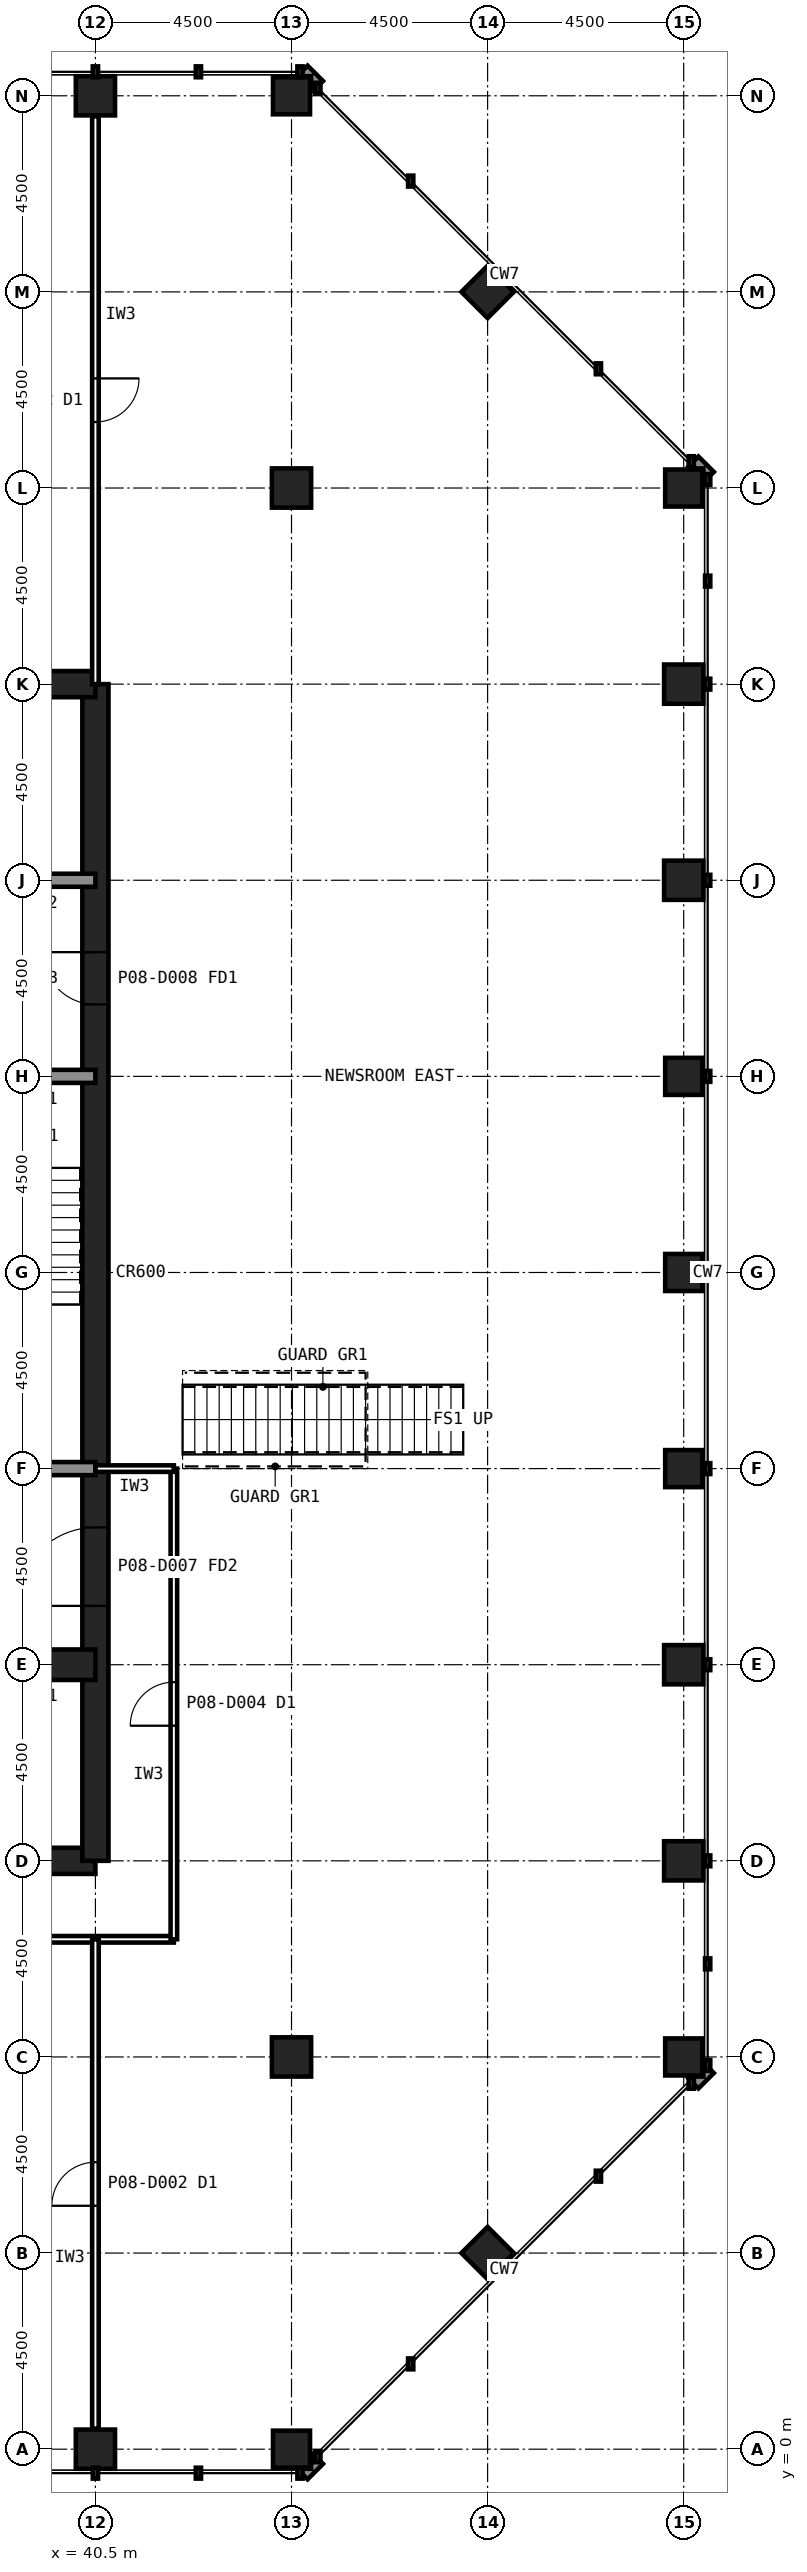
"""IFC4 building model, lengths in metres.
Left out: names, types, materials, properties, quantities, classifications, styles, units other than length and angle.
Written with IfcOpenShell. Run it as: python <this file> out.ifc"""

import sys

from ifc_helpers import new_model, si_unit, direction, frame, frame_2d, origin, origin_2d, place, context, subcontext, project, spatial, rectangle, hollow_rectangle, extrude, element, fill, save


model = new_model("IFC4")
c1 = context("Model", 3, precision=1e-05, world=origin(), true_north=direction((0.0, 1.0)))
c2 = subcontext(c1, "Body", "Model", "MODEL_VIEW")
j1 = project(units=[si_unit("LENGTHUNIT", "METRE"), si_unit("PLANEANGLEUNIT", "RADIAN")], contexts=[c1])
p1 = place(None, origin())
s1 = spatial("IfcSite", under=j1, at=p1, CompositionType="ELEMENT")
p2 = place(p1, origin())
s2 = spatial("IfcBuilding", under=s1, at=p2, CompositionType="ELEMENT")
p3 = place(p2, frame((0.0, 0.0, 37.4)))
s3 = spatial("IfcBuildingStorey", under=s2, at=p3, CompositionType="ELEMENT", Elevation=37.4)
p4 = place(p3, frame((40.5, 0.0, 0.0), z_axis=(0.0, 0.0, 1.0), x_axis=(1.0, 0.0, 0.0)))
e1 = element("IfcColumn", 1, at=p4, inside=s3, PredefinedType="COLUMN", context=c2, shape_type="SweptSolid", body=[
    extrude(hollow_rectangle(XDim=0.9, YDim=0.9, WallThickness=0.063, at=origin_2d()), origin(), (0.0, 0.0, 1.0), 4.2),
])
for number, where, z_axis, x_axis in (
    (2, (45.0, 0.0, 0.0), (0.0, 0.0, 1.0), (1.0, 0.0, 0.0)),
    (3, (54.0, 9.0, 0.0), (0.0, 0.0, 1.0), (1.0, 0.0, 0.0)),
):
    element("IfcColumn", number, at=place(p3, frame(where, z_axis=z_axis, x_axis=x_axis)), inside=s3, PredefinedType="COLUMN", context=c2, shape_type="SweptSolid", body=[
        extrude(hollow_rectangle(XDim=0.85, YDim=0.85, WallThickness=0.05, at=origin_2d()), origin(), (0.0, 0.0, 1.0), 4.2),
    ])
for number, where, z_axis, x_axis in (
    (4, (54.0, 13.5, 0.0), (0.0, 0.0, 1.0), (1.0, 0.0, 0.0)),
    (5, (54.0, 18.0, 0.0), (0.0, 0.0, 1.0), (1.0, 0.0, 0.0)),
):
    element("IfcColumn", number, at=place(p3, frame(where, z_axis=z_axis, x_axis=x_axis)), inside=s3, PredefinedType="COLUMN", context=c2, shape_type="SweptSolid", body=[
        extrude(hollow_rectangle(XDim=0.9, YDim=0.9, WallThickness=0.063, at=origin_2d()), origin(), (0.0, 0.0, 1.0), 4.2),
    ])
for number, where, z_axis, x_axis in (
    (6, (54.0, 22.5, 0.0), (0.0, 0.0, 1.0), (1.0, 0.0, 0.0)),
    (7, (54.0, 27.0, 0.0), (0.0, 0.0, 1.0), (1.0, 0.0, 0.0)),
    (8, (54.0, 31.5, 0.0), (0.0, 0.0, 1.0), (1.0, 0.0, 0.0)),
):
    element("IfcColumn", number, at=place(p3, frame(where, z_axis=z_axis, x_axis=x_axis)), inside=s3, PredefinedType="COLUMN", context=c2, shape_type="SweptSolid", body=[
        extrude(hollow_rectangle(XDim=0.85, YDim=0.85, WallThickness=0.05, at=origin_2d()), origin(), (0.0, 0.0, 1.0), 4.2),
    ])
for number, where, z_axis, x_axis in (
    (9, (54.0, 36.0, 0.0), (0.0, 0.0, 1.0), (1.0, 0.0, 0.0)),
    (10, (54.0, 40.5, 0.0), (0.0, 0.0, 1.0), (1.0, 0.0, 0.0)),
):
    element("IfcColumn", number, at=place(p3, frame(where, z_axis=z_axis, x_axis=x_axis)), inside=s3, PredefinedType="COLUMN", context=c2, shape_type="SweptSolid", body=[
        extrude(hollow_rectangle(XDim=0.9, YDim=0.9, WallThickness=0.063, at=origin_2d()), origin(), (0.0, 0.0, 1.0), 4.2),
    ])
for number, where, z_axis, x_axis in (
    (11, (54.0, 45.0, 0.0), (0.0, 0.0, 1.0), (1.0, 0.0, 0.0)),
    (12, (45.0, 54.0, 0.0), (0.0, 0.0, 1.0), (1.0, 0.0, 0.0)),
):
    element("IfcColumn", number, at=place(p3, frame(where, z_axis=z_axis, x_axis=x_axis)), inside=s3, PredefinedType="COLUMN", context=c2, shape_type="SweptSolid", body=[
        extrude(hollow_rectangle(XDim=0.85, YDim=0.85, WallThickness=0.05, at=origin_2d()), origin(), (0.0, 0.0, 1.0), 4.2),
    ])
p5 = place(p3, frame((40.5, 54.0, 0.0), z_axis=(0.0, 0.0, 1.0), x_axis=(1.0, 0.0, 0.0)))
e13 = element("IfcColumn", 13, at=p5, inside=s3, PredefinedType="COLUMN", context=c2, shape_type="SweptSolid", body=[
    extrude(hollow_rectangle(XDim=0.9, YDim=0.9, WallThickness=0.063, at=origin_2d()), origin(), (0.0, 0.0, 1.0), 4.2),
])
for number, where, z_axis, x_axis in (
    (14, (49.5, 4.5, 0.0), (0.0, 0.0, 1.0), (0.707, 0.707, 0.0)),
    (15, (49.5, 49.5, 0.0), (0.0, 0.0, 1.0), (0.707, 0.707, 0.0)),
):
    element("IfcColumn", number, at=place(p3, frame(where, z_axis=z_axis, x_axis=x_axis)), inside=s3, PredefinedType="COLUMN", context=c2, shape_type="SweptSolid", body=[
        extrude(hollow_rectangle(XDim=0.85, YDim=0.85, WallThickness=0.05, at=origin_2d()), origin(), (0.0, 0.0, 1.0), 4.2),
    ])
for number, where, z_axis, x_axis in (
    (16, (45.0, 9.0, 0.0), (0.0, 0.0, 1.0), (1.0, 0.0, 0.0)),
    (17, (45.0, 45.0, 0.0), (0.0, 0.0, 1.0), (1.0, 0.0, 0.0)),
):
    element("IfcColumn", number, at=place(p3, frame(where, z_axis=z_axis, x_axis=x_axis)), inside=s3, PredefinedType="COLUMN", context=c2, shape_type="SweptSolid", body=[
        extrude(hollow_rectangle(XDim=0.9, YDim=0.9, WallThickness=0.063, at=origin_2d()), origin(), (0.0, 0.0, 1.0), 4.2),
    ])
p6 = place(p3, frame((13.5, 13.5, 0.0), z_axis=(0.0, 0.0, 1.0), x_axis=(1.0, 0.0, 0.0)))
e18 = element("IfcWall", 18, at=p6, inside=s3, PredefinedType="SHEAR", context=c2, shape_type="SweptSolid", body=[
    extrude(rectangle(XDim=27.0, YDim=0.6, at=frame_2d((13.5, 0.0))), origin(), (0.0, 0.0, 1.0), 4.2),
])
p7 = place(p3, frame((40.5, 13.5, 0.0), z_axis=(0.0, 0.0, 1.0), x_axis=(0.0, 1.0, 0.0)))
e19 = element("IfcWall", 19, at=p7, inside=s3, PredefinedType="SHEAR", context=c2, shape_type="SweptSolid", body=[
    extrude(rectangle(XDim=27.0, YDim=0.6, at=frame_2d((13.5, 0.0))), origin(), (0.0, 0.0, 1.0), 4.2),
])
p8 = place(p7, frame((5.85, 0.0, 0.0)))
e20 = element("IfcOpeningElement", 20, at=p8, cuts=e19, PredefinedType="OPENING", context=c2, shape_type="SweptSolid", body=[
    extrude(rectangle(XDim=1.8, YDim=2.1, at=frame_2d((0.9, 1.05))), frame((0.0, 0.31, 0.0), z_axis=(0.0, -1.0, 0.0), x_axis=(1.0, 0.0, 0.0)), (0.0, 0.0, 1.0), 0.62),
])
p9 = place(p7, frame((19.65, 0.0, 0.0)))
e21 = element("IfcOpeningElement", 21, at=p9, cuts=e19, PredefinedType="OPENING", context=c2, shape_type="SweptSolid", body=[
    extrude(rectangle(XDim=1.2, YDim=2.1, at=frame_2d((0.6, 1.05))), frame((0.0, 0.31, 0.0), z_axis=(0.0, -1.0, 0.0), x_axis=(1.0, 0.0, 0.0)), (0.0, 0.0, 1.0), 0.62),
])
p10 = place(p3, frame((40.5, 40.5, 0.0), z_axis=(0.0, 0.0, 1.0), x_axis=(-1.0, 0.0, 0.0)))
e22 = element("IfcWall", 22, at=p10, inside=s3, PredefinedType="SHEAR", context=c2, shape_type="SweptSolid", body=[
    extrude(rectangle(XDim=27.0, YDim=0.6, at=frame_2d((13.5, 0.0))), origin(), (0.0, 0.0, 1.0), 4.2),
])
p11 = place(p3, frame((13.5, 18.0, 0.0), z_axis=(0.0, 0.0, 1.0), x_axis=(1.0, 0.0, 0.0)))
e23 = element("IfcWall", 23, at=p11, inside=s3, PredefinedType="SHEAR", context=c2, shape_type="SweptSolid", body=[
    extrude(rectangle(XDim=27.0, YDim=0.7, at=frame_2d((13.5, 0.0))), origin(), (0.0, 0.0, 1.0), 4.2),
])
p12 = place(p11, frame((24.3, 0.0, 0.0)))
e24 = element("IfcOpeningElement", 24, at=p12, cuts=e23, PredefinedType="OPENING", context=c2, shape_type="SweptSolid", body=[
    extrude(rectangle(XDim=0.9, YDim=2.1, at=frame_2d((0.45, 1.05))), frame((0.0, 0.36, 0.0), z_axis=(0.0, -1.0, 0.0), x_axis=(1.0, 0.0, 0.0)), (0.0, 0.0, 1.0), 0.72),
])
p13 = place(p11, frame((5.45, 0.0, 0.0)))
e25 = element("IfcOpeningElement", 25, at=p13, cuts=e23, PredefinedType="OPENING", context=c2, shape_type="SweptSolid", body=[
    extrude(rectangle(XDim=1.1, YDim=2.1, at=frame_2d((0.55, 1.05))), frame((0.0, 0.36, 0.0), z_axis=(0.0, -1.0, 0.0), x_axis=(1.0, 0.0, 0.0)), (0.0, 0.0, 1.0), 0.72),
])
p14 = place(p11, frame((8.45, 0.0, 0.0)))
e26 = element("IfcOpeningElement", 26, at=p14, cuts=e23, PredefinedType="OPENING", context=c2, shape_type="SweptSolid", body=[
    extrude(rectangle(XDim=1.1, YDim=2.1, at=frame_2d((0.55, 1.05))), frame((0.0, 0.36, 0.0), z_axis=(0.0, -1.0, 0.0), x_axis=(1.0, 0.0, 0.0)), (0.0, 0.0, 1.0), 0.72),
])
p15 = place(p11, frame((11.45, 0.0, 0.0)))
e27 = element("IfcOpeningElement", 27, at=p15, cuts=e23, PredefinedType="OPENING", context=c2, shape_type="SweptSolid", body=[
    extrude(rectangle(XDim=1.1, YDim=2.1, at=frame_2d((0.55, 1.05))), frame((0.0, 0.36, 0.0), z_axis=(0.0, -1.0, 0.0), x_axis=(1.0, 0.0, 0.0)), (0.0, 0.0, 1.0), 0.72),
])
p16 = place(p11, frame((14.45, 0.0, 0.0)))
e28 = element("IfcOpeningElement", 28, at=p16, cuts=e23, PredefinedType="OPENING", context=c2, shape_type="SweptSolid", body=[
    extrude(rectangle(XDim=1.1, YDim=2.1, at=frame_2d((0.55, 1.05))), frame((0.0, 0.36, 0.0), z_axis=(0.0, -1.0, 0.0), x_axis=(1.0, 0.0, 0.0)), (0.0, 0.0, 1.0), 0.72),
])
p17 = place(p11, frame((17.45, 0.0, 0.0)))
e29 = element("IfcOpeningElement", 29, at=p17, cuts=e23, PredefinedType="OPENING", context=c2, shape_type="SweptSolid", body=[
    extrude(rectangle(XDim=1.1, YDim=2.1, at=frame_2d((0.55, 1.05))), frame((0.0, 0.36, 0.0), z_axis=(0.0, -1.0, 0.0), x_axis=(1.0, 0.0, 0.0)), (0.0, 0.0, 1.0), 0.72),
])
p18 = place(p11, frame((20.45, 0.0, 0.0)))
e30 = element("IfcOpeningElement", 30, at=p18, cuts=e23, PredefinedType="OPENING", context=c2, shape_type="SweptSolid", body=[
    extrude(rectangle(XDim=1.1, YDim=2.1, at=frame_2d((0.55, 1.05))), frame((0.0, 0.36, 0.0), z_axis=(0.0, -1.0, 0.0), x_axis=(1.0, 0.0, 0.0)), (0.0, 0.0, 1.0), 0.72),
])
p19 = place(p11, frame((1.6, 0.0, 0.0)))
e31 = element("IfcOpeningElement", 31, at=p19, cuts=e23, PredefinedType="OPENING", context=c2, shape_type="SweptSolid", body=[
    extrude(rectangle(XDim=1.3, YDim=2.2, at=frame_2d((0.65, 1.1))), frame((0.0, 0.36, 0.0), z_axis=(0.0, -1.0, 0.0), x_axis=(1.0, 0.0, 0.0)), (0.0, 0.0, 1.0), 0.72),
])
p20 = place(p3, frame((13.5, 36.0, 0.0), z_axis=(0.0, 0.0, 1.0), x_axis=(1.0, 0.0, 0.0)))
e32 = element("IfcWall", 32, at=p20, inside=s3, PredefinedType="SOLIDWALL", context=c2, shape_type="SweptSolid", body=[
    extrude(rectangle(XDim=27.0, YDim=0.3, at=frame_2d((13.5, 0.0))), origin(), (0.0, 0.0, 1.0), 4.04),
])
p21 = place(p20, frame((1.8, 0.0, 0.0)))
e33 = element("IfcOpeningElement", 33, at=p21, cuts=e32, PredefinedType="OPENING", context=c2, shape_type="SweptSolid", body=[
    extrude(rectangle(XDim=0.9, YDim=2.1, at=frame_2d((0.45, 1.05))), frame((0.0, 0.16, 0.0), z_axis=(0.0, -1.0, 0.0), x_axis=(1.0, 0.0, 0.0)), (0.0, 0.0, 1.0), 0.32),
])
p22 = place(p20, frame((24.1, 0.0, 0.0)))
e34 = element("IfcOpeningElement", 34, at=p22, cuts=e32, PredefinedType="OPENING", context=c2, shape_type="SweptSolid", body=[
    extrude(rectangle(XDim=1.3, YDim=2.2, at=frame_2d((0.65, 1.1))), frame((0.0, 0.16, 0.0), z_axis=(0.0, -1.0, 0.0), x_axis=(1.0, 0.0, 0.0)), (0.0, 0.0, 1.0), 0.32),
])
p23 = place(p3, frame((13.5, 22.5, 0.0), z_axis=(0.0, 0.0, 1.0), x_axis=(1.0, 0.0, 0.0)))
e35 = element("IfcWall", 35, at=p23, inside=s3, PredefinedType="SOLIDWALL", context=c2, shape_type="SweptSolid", body=[
    extrude(rectangle(XDim=27.0, YDim=0.3, at=frame_2d((13.5, 0.0))), origin(), (0.0, 0.0, 1.0), 4.04),
])
p24 = place(p23, frame((1.65, 0.0, 0.0)))
e36 = element("IfcOpeningElement", 36, at=p24, cuts=e35, PredefinedType="OPENING", context=c2, shape_type="SweptSolid", body=[
    extrude(rectangle(XDim=1.2, YDim=2.1, at=frame_2d((0.6, 1.05))), frame((0.0, 0.16, 0.0), z_axis=(0.0, -1.0, 0.0), x_axis=(1.0, 0.0, 0.0)), (0.0, 0.0, 1.0), 0.32),
])
p25 = place(p23, frame((6.025, 0.0, 0.0)))
e37 = element("IfcOpeningElement", 37, at=p25, cuts=e35, PredefinedType="OPENING", context=c2, shape_type="SweptSolid", body=[
    extrude(rectangle(XDim=1.0, YDim=2.1, at=frame_2d((0.5, 1.05))), frame((0.0, 0.16, 0.0), z_axis=(0.0, -1.0, 0.0), x_axis=(1.0, 0.0, 0.0)), (0.0, 0.0, 1.0), 0.32),
])
p26 = place(p23, frame((10.525, 0.0, 0.0)))
e38 = element("IfcOpeningElement", 38, at=p26, cuts=e35, PredefinedType="OPENING", context=c2, shape_type="SweptSolid", body=[
    extrude(rectangle(XDim=1.0, YDim=2.1, at=frame_2d((0.5, 1.05))), frame((0.0, 0.16, 0.0), z_axis=(0.0, -1.0, 0.0), x_axis=(1.0, 0.0, 0.0)), (0.0, 0.0, 1.0), 0.32),
])
p27 = place(p23, frame((19.75, 0.0, 0.0)))
e39 = element("IfcOpeningElement", 39, at=p27, cuts=e35, PredefinedType="OPENING", context=c2, shape_type="SweptSolid", body=[
    extrude(rectangle(XDim=1.0, YDim=2.1, at=frame_2d((0.5, 1.05))), frame((0.0, 0.16, 0.0), z_axis=(0.0, -1.0, 0.0), x_axis=(1.0, 0.0, 0.0)), (0.0, 0.0, 1.0), 0.32),
])
p28 = place(p23, frame((15.05, 0.0, 0.0)))
e40 = element("IfcOpeningElement", 40, at=p28, cuts=e35, PredefinedType="OPENING", context=c2, shape_type="SweptSolid", body=[
    extrude(rectangle(XDim=1.4, YDim=2.4, at=frame_2d((0.7, 1.2))), frame((0.0, 0.16, 0.0), z_axis=(0.0, -1.0, 0.0), x_axis=(1.0, 0.0, 0.0)), (0.0, 0.0, 1.0), 0.32),
])
p29 = place(p3, frame((13.5, 31.5, 0.0), z_axis=(0.0, 0.0, 1.0), x_axis=(1.0, 0.0, 0.0)))
e41 = element("IfcWall", 41, at=p29, inside=s3, PredefinedType="SOLIDWALL", context=c2, shape_type="SweptSolid", body=[
    extrude(rectangle(XDim=27.0, YDim=0.3, at=frame_2d((13.5, 0.0))), origin(), (0.0, 0.0, 1.0), 4.04),
])
p30 = place(p29, frame((24.15, 0.0, 0.0)))
e42 = element("IfcOpeningElement", 42, at=p30, cuts=e41, PredefinedType="OPENING", context=c2, shape_type="SweptSolid", body=[
    extrude(rectangle(XDim=1.2, YDim=2.1, at=frame_2d((0.6, 1.05))), frame((0.0, 0.16, 0.0), z_axis=(0.0, -1.0, 0.0), x_axis=(1.0, 0.0, 0.0)), (0.0, 0.0, 1.0), 0.32),
])
p31 = place(p29, frame((15.3, 0.0, 0.0)))
e43 = element("IfcOpeningElement", 43, at=p31, cuts=e41, PredefinedType="OPENING", context=c2, shape_type="SweptSolid", body=[
    extrude(rectangle(XDim=0.9, YDim=2.1, at=frame_2d((0.45, 1.05))), frame((0.0, 0.16, 0.0), z_axis=(0.0, -1.0, 0.0), x_axis=(1.0, 0.0, 0.0)), (0.0, 0.0, 1.0), 0.32),
])
p32 = place(p29, frame((19.8, 0.0, 0.0)))
e44 = element("IfcOpeningElement", 44, at=p32, cuts=e41, PredefinedType="OPENING", context=c2, shape_type="SweptSolid", body=[
    extrude(rectangle(XDim=0.9, YDim=2.1, at=frame_2d((0.45, 1.05))), frame((0.0, 0.16, 0.0), z_axis=(0.0, -1.0, 0.0), x_axis=(1.0, 0.0, 0.0)), (0.0, 0.0, 1.0), 0.32),
])
p33 = place(p3, frame((11.7, 11.7, 0.0), z_axis=(0.0, 0.0, 1.0), x_axis=(1.0, 0.0, 0.0)))
e45 = element("IfcWall", 45, at=p33, inside=s3, PredefinedType="PARTITIONING", context=c2, shape_type="SweptSolid", body=[
    extrude(rectangle(XDim=30.6, YDim=0.15, at=frame_2d((15.3, 0.0))), origin(), (0.0, 0.0, 1.0), 4.04),
])
p34 = place(p33, frame((14.8, 0.0, 0.0)))
e46 = element("IfcOpeningElement", 46, at=p34, cuts=e45, PredefinedType="OPENING", context=c2, shape_type="SweptSolid", body=[
    extrude(rectangle(XDim=1.0, YDim=2.1, at=frame_2d((0.5, 1.05))), frame((0.0, 0.085, 0.0), z_axis=(0.0, -1.0, 0.0), x_axis=(1.0, 0.0, 0.0)), (0.0, 0.0, 1.0), 0.17),
])
p35 = place(p3, frame((42.3, 11.7, 0.0), z_axis=(0.0, 0.0, 1.0), x_axis=(0.0, 1.0, 0.0)))
e47 = element("IfcWall", 47, at=p35, inside=s3, PredefinedType="PARTITIONING", context=c2, shape_type="SweptSolid", body=[
    extrude(rectangle(XDim=10.8, YDim=0.15, at=frame_2d((5.4, 0.0))), origin(), (0.0, 0.0, 1.0), 4.04),
])
p36 = place(p35, frame((4.9, 0.0, 0.0)))
e48 = element("IfcOpeningElement", 48, at=p36, cuts=e47, PredefinedType="OPENING", context=c2, shape_type="SweptSolid", body=[
    extrude(rectangle(XDim=1.0, YDim=2.1, at=frame_2d((0.5, 1.05))), frame((0.0, 0.085, 0.0), z_axis=(0.0, -1.0, 0.0), x_axis=(1.0, 0.0, 0.0)), (0.0, 0.0, 1.0), 0.17),
])
p37 = place(p3, frame((42.3, 22.5, 0.0), z_axis=(0.0, 0.0, 1.0), x_axis=(-1.0, 0.0, 0.0)))
e49 = element("IfcWall", 49, at=p37, inside=s3, PredefinedType="PARTITIONING", context=c2, shape_type="SweptSolid", body=[
    extrude(rectangle(XDim=1.8, YDim=0.15, at=frame_2d((0.9, 0.0))), origin(), (0.0, 0.0, 1.0), 3.189),
])
p38 = place(p3, frame((40.5, 53.53, 0.0), z_axis=(0.0, 0.0, 1.0), x_axis=(0.0, -1.0, 0.0)))
e50 = element("IfcWall", 50, at=p38, inside=s3, PredefinedType="PARTITIONING", context=c2, shape_type="SweptSolid", body=[
    extrude(rectangle(XDim=13.03, YDim=0.15, at=frame_2d((6.515, 0.0))), origin(), (0.0, 0.0, 1.0), 3.189),
])
p39 = place(p38, frame((6.015, 0.0, 0.0)))
e51 = element("IfcOpeningElement", 51, at=p39, cuts=e50, PredefinedType="OPENING", context=c2, shape_type="SweptSolid", body=[
    extrude(rectangle(XDim=1.0, YDim=2.1, at=frame_2d((0.5, 1.05))), frame((0.0, 0.085, 0.0), z_axis=(0.0, -1.0, 0.0), x_axis=(1.0, 0.0, 0.0)), (0.0, 0.0, 1.0), 0.17),
])
p40 = place(p3, frame((40.5, 0.47, 0.0), z_axis=(0.0, 0.0, 1.0), x_axis=(0.0, 1.0, 0.0)))
e52 = element("IfcWall", 52, at=p40, inside=s3, PredefinedType="PARTITIONING", context=c2, shape_type="SweptSolid", body=[
    extrude(rectangle(XDim=11.23, YDim=0.15, at=frame_2d((5.615, 0.0))), origin(), (0.0, 0.0, 1.0), 3.189),
])
p41 = place(p40, frame((5.115, 0.0, 0.0)))
e53 = element("IfcOpeningElement", 53, at=p41, cuts=e52, PredefinedType="OPENING", context=c2, shape_type="SweptSolid", body=[
    extrude(rectangle(XDim=1.0, YDim=2.1, at=frame_2d((0.5, 1.05))), frame((0.0, 0.085, 0.0), z_axis=(0.0, -1.0, 0.0), x_axis=(1.0, 0.0, 0.0)), (0.0, 0.0, 1.0), 0.17),
])
p42 = place(p8, origin())
e54 = element("IfcDoor", 54, at=p42, inside=s3, OperationType="SINGLE_SWING_LEFT", PredefinedType="DOOR", context=c2, shape_type="SweptSolid", body=[
    extrude(rectangle(XDim=1.8, YDim=2.1, at=frame_2d((0.9, 1.05))), frame((0.0, 0.025, 0.0), z_axis=(0.0, -1.0, 0.0), x_axis=(1.0, 0.0, 0.0)), (0.0, 0.0, 1.0), 0.05),
])
fill(e20, e54)
p43 = place(p9, origin())
e55 = element("IfcDoor", 55, at=p43, inside=s3, OperationType="SINGLE_SWING_RIGHT", PredefinedType="DOOR", context=c2, shape_type="SweptSolid", body=[
    extrude(rectangle(XDim=1.2, YDim=2.1, at=frame_2d((0.6, 1.05))), frame((0.0, 0.025, 0.0), z_axis=(0.0, -1.0, 0.0), x_axis=(1.0, 0.0, 0.0)), (0.0, 0.0, 1.0), 0.05),
])
fill(e21, e55)
p44 = place(p36, origin())
e56 = element("IfcDoor", 56, at=p44, inside=s3, OperationType="SINGLE_SWING_LEFT", PredefinedType="DOOR", context=c2, shape_type="SweptSolid", body=[
    extrude(rectangle(XDim=1.0, YDim=2.1, at=frame_2d((0.5, 1.05))), frame((0.0, 0.025, 0.0), z_axis=(0.0, -1.0, 0.0), x_axis=(1.0, 0.0, 0.0)), (0.0, 0.0, 1.0), 0.05),
])
fill(e48, e56)
p45 = place(p39, origin())
e57 = element("IfcDoor", 57, at=p45, inside=s3, OperationType="SINGLE_SWING_LEFT", PredefinedType="DOOR", context=c2, shape_type="SweptSolid", body=[
    extrude(rectangle(XDim=1.0, YDim=2.1, at=frame_2d((0.5, 1.05))), frame((0.0, 0.025, 0.0), z_axis=(0.0, -1.0, 0.0), x_axis=(1.0, 0.0, 0.0)), (0.0, 0.0, 1.0), 0.05),
])
fill(e51, e57)
p46 = place(p41, origin())
e58 = element("IfcDoor", 58, at=p46, inside=s3, OperationType="SINGLE_SWING_LEFT", PredefinedType="DOOR", context=c2, shape_type="SweptSolid", body=[
    extrude(rectangle(XDim=1.0, YDim=2.1, at=frame_2d((0.5, 1.05))), frame((0.0, 0.025, 0.0), z_axis=(0.0, -1.0, 0.0), x_axis=(1.0, 0.0, 0.0)), (0.0, 0.0, 1.0), 0.05),
])
fill(e53, e58)
save(model, sys.argv[1])
